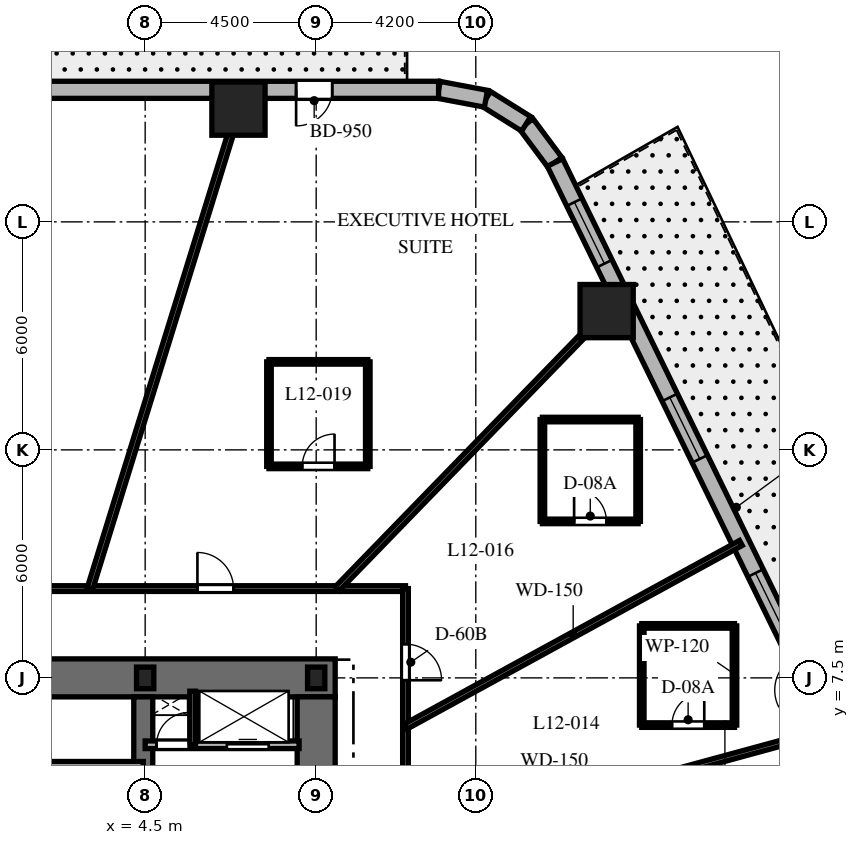
"""IFC4 building model, lengths in metres.
Left out: names, types, materials, properties, quantities, classifications, styles, units other than length and angle.
Written with IfcOpenShell. Run it as: python <this file> out.ifc"""

import sys

from ifc_helpers import new_model, si_unit, direction, frame, frame_2d, origin, origin_2d, place, context, subcontext, project, spatial, rectangle, i_section, extrude, element, fill, save


model = new_model("IFC4")
c1 = context("Model", 3, precision=1e-05, world=origin(), true_north=direction((0.0, 1.0)))
c2 = subcontext(c1, "Body", "Model", "MODEL_VIEW")
j1 = project(units=[si_unit("LENGTHUNIT", "METRE"), si_unit("PLANEANGLEUNIT", "RADIAN")], contexts=[c1])
p1 = place(None, origin())
s1 = spatial("IfcSite", under=j1, at=p1, CompositionType="ELEMENT")
p2 = place(p1, origin())
s2 = spatial("IfcBuilding", under=s1, at=p2, CompositionType="ELEMENT")
p3 = place(p2, frame((0.0, 0.0, 56.4)))
s3 = spatial("IfcBuildingStorey", under=s2, at=p3, CompositionType="ELEMENT", Elevation=56.4)
p4 = place(p3, frame((1.85, 7.5, 0.0), z_axis=(0.0, 0.0, 1.0), x_axis=(1.0, 0.0, 0.0)))
e1 = element("IfcWall", 1, at=p4, inside=s3, PredefinedType="SHEAR", context=c2, shape_type="SweptSolid", body=[
    extrude(rectangle(XDim=7.65, YDim=1.0, at=frame_2d((3.825, 0.0))), origin(), (0.0, 0.0, 1.0), 3.7),
])
p5 = place(p3, frame((9.0, -7.0, 0.0), z_axis=(0.0, 0.0, 1.0), x_axis=(0.0, 1.0, 0.0)))
e2 = element("IfcWall", 2, at=p5, inside=s3, PredefinedType="SHEAR", context=c2, shape_type="SweptSolid", body=[
    extrude(rectangle(XDim=14.0, YDim=1.0, at=frame_2d((7.0, 0.0))), origin(), (0.0, 0.0, 1.0), 3.7),
])
p6 = place(p5, frame((10.125, 0.0, 0.0)))
e3 = element("IfcOpeningElement", 3, at=p6, cuts=e2, PredefinedType="OPENING", context=c2, shape_type="SweptSolid", body=[
    extrude(rectangle(XDim=1.05, YDim=2.15, at=frame_2d((0.525, 1.075))), frame((0.0, 0.51, 0.0), z_axis=(0.0, -1.0, 0.0), x_axis=(1.0, 0.0, 0.0)), (0.0, 0.0, 1.0), 1.02),
])
p7 = place(p3, frame((4.45, 2.25, 0.0), z_axis=(0.0, 0.0, 1.0), x_axis=(0.0, 1.0, 0.0)))
e4 = element("IfcWall", 4, at=p7, inside=s3, PredefinedType="SHEAR", context=c2, shape_type="SweptSolid", body=[
    extrude(rectangle(XDim=4.75, YDim=0.5, at=frame_2d((2.375, 0.0))), origin(), (0.0, 0.0, 1.0), 3.7),
])
for number, where, z_axis, x_axis in (
    (5, (9.0, 7.5, 0.0), (0.0, 0.0, 1.0), (1.0, 0.0, 0.0)),
    (6, (4.5, 7.5, 0.0), (0.0, 0.0, 1.0), (1.0, 0.0, 0.0)),
):
    element("IfcColumn", number, at=place(p3, frame(where, z_axis=z_axis, x_axis=x_axis)), inside=s3, PredefinedType="COLUMN", context=c2, shape_type="SweptSolid", body=[
        extrude(i_section(OverallWidth=0.454, OverallDepth=0.569, WebThickness=0.078, FlangeThickness=0.125, at=origin_2d()), origin(), (0.0, 0.0, 1.0), 3.7),
    ])
for number, where, z_axis, x_axis in (
    (7, (16.643, 17.152, 0.0), (0.0, 0.0, 1.0), (1.0, 0.0, 0.0)),
    (8, (6.955, 22.48, 0.0), (0.0, 0.0, 1.0), (1.0, 0.0, 0.0)),
):
    element("IfcColumn", number, at=place(p3, frame(where, z_axis=z_axis, x_axis=x_axis)), inside=s3, PredefinedType="COLUMN", context=c2, shape_type="SweptSolid", body=[
        extrude(rectangle(XDim=1.4, YDim=1.4, at=origin_2d()), origin(), (0.0, 0.0, 1.0), 3.7),
    ])
p8 = place(p3, frame((15.284, 21.062, 0.0), z_axis=(0.0, 0.0, 1.0), x_axis=(-0.597595366449, 0.801797841104, 0.0)))
e9 = element("IfcWall", 9, at=p8, inside=s3, PredefinedType="SOLIDWALL", context=c2, shape_type="SweptSolid", body=[
    extrude(rectangle(XDim=1.269, YDim=0.45, at=frame_2d((0.634, 0.0))), origin(), (0.0, 0.0, 1.0), 3.4),
])
p9 = place(p3, frame((14.526, 22.08, 0.0), z_axis=(0.0, 0.0, 1.0), x_axis=(-0.848185203596, 0.529699783275, 0.0)))
e10 = element("IfcWall", 10, at=p9, inside=s3, PredefinedType="SOLIDWALL", context=c2, shape_type="SweptSolid", body=[
    extrude(rectangle(XDim=1.247, YDim=0.45, at=frame_2d((0.624, 0.0))), origin(), (0.0, 0.0, 1.0), 3.4),
])
p10 = place(p3, frame((13.468, 22.74, 0.0), z_axis=(0.0, 0.0, 1.0), x_axis=(-0.982717174228, 0.185113358451, 0.0)))
e11 = element("IfcWall", 11, at=p10, inside=s3, PredefinedType="SOLIDWALL", context=c2, shape_type="SweptSolid", body=[
    extrude(rectangle(XDim=1.269, YDim=0.45, at=frame_2d((0.634, 0.0))), origin(), (0.0, 0.0, 1.0), 3.4),
])
p11 = place(p3, frame((24.336, 2.532, 0.0), z_axis=(0.0, 0.0, 1.0), x_axis=(-0.438931326393, 0.898520612291, 0.0)))
e12 = element("IfcWall", 12, at=p11, inside=s3, PredefinedType="SOLIDWALL", context=c2, shape_type="SweptSolid", body=[
    extrude(rectangle(XDim=20.623, YDim=0.45, at=frame_2d((10.312, 0.0))), origin(), (0.0, 0.0, 1.0), 3.4),
])
p12 = place(p11, frame((5.171, 0.0, 0.0)))
e13 = element("IfcOpeningElement", 13, at=p12, cuts=e12, PredefinedType="OPENING", context=c2, shape_type="SweptSolid", body=[
    extrude(rectangle(XDim=1.0, YDim=2.15, at=frame_2d((0.5, 1.075))), frame((0.0, 0.235, 0.0), z_axis=(0.0, -1.0, 0.0), x_axis=(1.0, 0.0, 0.0)), (0.0, 0.0, 1.0), 0.47),
])
p13 = place(p11, frame((6.8, 0.0, 0.8)))
e14 = element("IfcOpeningElement", 14, at=p13, cuts=e12, PredefinedType="OPENING", context=c2, shape_type="SweptSolid", body=[
    extrude(rectangle(XDim=1.8, YDim=1.8, at=frame_2d((0.9, 0.9))), frame((0.0, 0.235, 0.0), z_axis=(0.0, -1.0, 0.0), x_axis=(1.0, 0.0, 0.0)), (0.0, 0.0, 1.0), 0.47),
])
p14 = place(p11, frame((11.942, 0.0, 0.8)))
e15 = element("IfcOpeningElement", 15, at=p14, cuts=e12, PredefinedType="OPENING", context=c2, shape_type="SweptSolid", body=[
    extrude(rectangle(XDim=1.8, YDim=1.8, at=frame_2d((0.9, 0.9))), frame((0.0, 0.235, 0.0), z_axis=(0.0, -1.0, 0.0), x_axis=(1.0, 0.0, 0.0)), (0.0, 0.0, 1.0), 0.47),
])
p15 = place(p11, frame((17.66, 0.0, 0.8)))
e16 = element("IfcOpeningElement", 16, at=p15, cuts=e12, PredefinedType="OPENING", context=c2, shape_type="SweptSolid", body=[
    extrude(rectangle(XDim=1.8, YDim=1.8, at=frame_2d((0.9, 0.9))), frame((0.0, 0.235, 0.0), z_axis=(0.0, -1.0, 0.0), x_axis=(1.0, 0.0, 0.0)), (0.0, 0.0, 1.0), 0.47),
])
p16 = place(p11, frame((1.214, 0.0, 0.8)))
e17 = element("IfcOpeningElement", 17, at=p16, cuts=e12, PredefinedType="OPENING", context=c2, shape_type="SweptSolid", body=[
    extrude(rectangle(XDim=1.8, YDim=1.8, at=frame_2d((0.9, 0.9))), frame((0.0, 0.235, 0.0), z_axis=(0.0, -1.0, 0.0), x_axis=(1.0, 0.0, 0.0)), (0.0, 0.0, 1.0), 0.47),
])
p17 = place(p3, frame((12.221, 22.975, 0.0), z_axis=(0.0, 0.0, 1.0), x_axis=(-1.0, 0.0, 0.0)))
e18 = element("IfcWall", 18, at=p17, inside=s3, PredefinedType="SOLIDWALL", context=c2, shape_type="SweptSolid", body=[
    extrude(rectangle(XDim=26.389, YDim=0.45, at=frame_2d((13.195, 0.0))), origin(), (0.0, 0.0, 1.0), 3.4),
])
p18 = place(p17, frame((2.799, 0.0, 0.0)))
e19 = element("IfcOpeningElement", 19, at=p18, cuts=e18, PredefinedType="OPENING", context=c2, shape_type="SweptSolid", body=[
    extrude(rectangle(XDim=0.95, YDim=2.15, at=frame_2d((0.475, 1.075))), frame((0.0, 0.235, 0.0), z_axis=(0.0, -1.0, 0.0), x_axis=(1.0, 0.0, 0.0)), (0.0, 0.0, 1.0), 0.47),
])
p19 = place(p17, frame((12.296, 0.0, 0.8)))
e20 = element("IfcOpeningElement", 20, at=p19, cuts=e18, PredefinedType="OPENING", context=c2, shape_type="SweptSolid", body=[
    extrude(rectangle(XDim=1.8, YDim=1.8, at=frame_2d((0.9, 0.9))), frame((0.0, 0.235, 0.0), z_axis=(0.0, -1.0, 0.0), x_axis=(1.0, 0.0, 0.0)), (0.0, 0.0, 1.0), 0.47),
])
p20 = place(p17, frame((22.938, 0.0, 0.8)))
e21 = element("IfcOpeningElement", 21, at=p20, cuts=e18, PredefinedType="OPENING", context=c2, shape_type="SweptSolid", body=[
    extrude(rectangle(XDim=1.8, YDim=1.8, at=frame_2d((0.9, 0.9))), frame((0.0, 0.235, 0.0), z_axis=(0.0, -1.0, 0.0), x_axis=(1.0, 0.0, 0.0)), (0.0, 0.0, 1.0), 0.47),
])
p21 = place(p3, frame((4.5, 5.74, 0.0), z_axis=(0.0, 0.0, 1.0), x_axis=(1.0, 0.0, 0.0)))
e22 = element("IfcWall", 22, at=p21, inside=s3, PredefinedType="PARTITIONING", context=c2, shape_type="SweptSolid", body=[
    extrude(rectangle(XDim=4.05, YDim=0.2, at=frame_2d((2.025, 0.0))), origin(), (0.0, 0.0, 1.0), 3.4),
])
p22 = place(p21, frame((0.3, 0.0, 0.0)))
e23 = element("IfcOpeningElement", 23, at=p22, cuts=e22, PredefinedType="OPENING", context=c2, shape_type="SweptSolid", body=[
    extrude(rectangle(XDim=0.85, YDim=2.03, at=frame_2d((0.425, 1.015))), frame((0.0, 0.11, 0.0), z_axis=(0.0, -1.0, 0.0), x_axis=(1.0, 0.0, 0.0)), (0.0, 0.0, 1.0), 0.22),
])
p23 = place(p21, frame((2.15, 0.0, 0.0)))
e24 = element("IfcOpeningElement", 24, at=p23, cuts=e22, PredefinedType="OPENING", context=c2, shape_type="SweptSolid", body=[
    extrude(rectangle(XDim=1.1, YDim=2.2, at=frame_2d((0.55, 1.1))), frame((0.0, 0.11, 0.0), z_axis=(0.0, -1.0, 0.0), x_axis=(1.0, 0.0, 0.0)), (0.0, 0.0, 1.0), 0.22),
])
p24 = place(p3, frame((5.75, 5.74, 0.0), z_axis=(0.0, 0.0, 1.0), x_axis=(0.0, 1.0, 0.0)))
e25 = element("IfcWall", 25, at=p24, inside=s3, PredefinedType="PARTITIONING", context=c2, shape_type="SweptSolid", body=[
    extrude(rectangle(XDim=1.41, YDim=0.15, at=frame_2d((0.705, 0.0))), origin(), (0.0, 0.0, 1.0), 3.4),
])
p25 = place(p3, frame((1.85, 5.2, 0.0), z_axis=(0.0, 0.0, 1.0), x_axis=(1.0, 0.0, 0.0)))
e26 = element("IfcWall", 26, at=p25, inside=s3, PredefinedType="PARTITIONING", context=c2, shape_type="SweptSolid", body=[
    extrude(rectangle(XDim=2.6, YDim=0.2, at=frame_2d((1.3, 0.0))), origin(), (0.0, 0.0, 1.0), 3.4),
])
p26 = place(p3, frame((-11.35, 9.85, 0.0), z_axis=(0.0, 0.0, 1.0), x_axis=(1.0, 0.0, 0.0)))
e27 = element("IfcWall", 27, at=p26, inside=s3, PredefinedType="PARTITIONING", context=c2, shape_type="SweptSolid", body=[
    extrude(rectangle(XDim=22.7, YDim=0.15, at=frame_2d((11.35, 0.0))), origin(), (0.0, 0.0, 1.0), 2.84),
])
p27 = place(p26, frame((17.225, 0.0, 0.0)))
e28 = element("IfcOpeningElement", 28, at=p27, cuts=e27, PredefinedType="OPENING", context=c2, shape_type="SweptSolid", body=[
    extrude(rectangle(XDim=0.95, YDim=2.03, at=frame_2d((0.475, 1.015))), frame((0.0, 0.085, 0.0), z_axis=(0.0, -1.0, 0.0), x_axis=(1.0, 0.0, 0.0)), (0.0, 0.0, 1.0), 0.17),
])
p28 = place(p26, frame((10.444, 0.0, 0.0)))
e29 = element("IfcOpeningElement", 29, at=p28, cuts=e27, PredefinedType="OPENING", context=c2, shape_type="SweptSolid", body=[
    extrude(rectangle(XDim=0.95, YDim=2.03, at=frame_2d((0.475, 1.015))), frame((0.0, 0.085, 0.0), z_axis=(0.0, -1.0, 0.0), x_axis=(1.0, 0.0, 0.0)), (0.0, 0.0, 1.0), 0.17),
])
p29 = place(p26, frame((3.369, 0.0, 0.0)))
e30 = element("IfcOpeningElement", 30, at=p29, cuts=e27, PredefinedType="OPENING", context=c2, shape_type="SweptSolid", body=[
    extrude(rectangle(XDim=0.95, YDim=2.03, at=frame_2d((0.475, 1.015))), frame((0.0, 0.085, 0.0), z_axis=(0.0, -1.0, 0.0), x_axis=(1.0, 0.0, 0.0)), (0.0, 0.0, 1.0), 0.17),
])
p30 = place(p3, frame((11.35, 9.85, 0.0), z_axis=(0.0, 0.0, 1.0), x_axis=(0.0, -1.0, 0.0)))
e31 = element("IfcWall", 31, at=p30, inside=s3, PredefinedType="PARTITIONING", context=c2, shape_type="SweptSolid", body=[
    extrude(rectangle(XDim=19.7, YDim=0.15, at=frame_2d((9.85, 0.0))), origin(), (0.0, 0.0, 1.0), 2.84),
])
p31 = place(p30, frame((4.704, 0.0, 0.0)))
e32 = element("IfcOpeningElement", 32, at=p31, cuts=e31, PredefinedType="OPENING", context=c2, shape_type="SweptSolid", body=[
    extrude(rectangle(XDim=0.95, YDim=2.03, at=frame_2d((0.475, 1.015))), frame((0.0, 0.085, 0.0), z_axis=(0.0, -1.0, 0.0), x_axis=(1.0, 0.0, 0.0)), (0.0, 0.0, 1.0), 0.17),
])
p32 = place(p30, frame((1.462, 0.0, 0.0)))
e33 = element("IfcOpeningElement", 33, at=p32, cuts=e31, PredefinedType="OPENING", context=c2, shape_type="SweptSolid", body=[
    extrude(rectangle(XDim=0.95, YDim=2.03, at=frame_2d((0.475, 1.015))), frame((0.0, 0.085, 0.0), z_axis=(0.0, -1.0, 0.0), x_axis=(1.0, 0.0, 0.0)), (0.0, 0.0, 1.0), 0.17),
])
p33 = place(p30, frame((15.191, 0.0, 0.0)))
e34 = element("IfcOpeningElement", 34, at=p33, cuts=e31, PredefinedType="OPENING", context=c2, shape_type="SweptSolid", body=[
    extrude(rectangle(XDim=0.95, YDim=2.03, at=frame_2d((0.475, 1.015))), frame((0.0, 0.085, 0.0), z_axis=(0.0, -1.0, 0.0), x_axis=(1.0, 0.0, 0.0)), (0.0, 0.0, 1.0), 0.17),
])
p34 = place(p30, frame((8.838, 0.0, 0.0)))
e35 = element("IfcOpeningElement", 35, at=p34, cuts=e31, PredefinedType="OPENING", context=c2, shape_type="SweptSolid", body=[
    extrude(rectangle(XDim=0.95, YDim=2.03, at=frame_2d((0.475, 1.015))), frame((0.0, 0.085, 0.0), z_axis=(0.0, -1.0, 0.0), x_axis=(1.0, 0.0, 0.0)), (0.0, 0.0, 1.0), 0.17),
])
p35 = place(p3, frame((11.35, 3.091, 0.0), z_axis=(0.0, 0.0, 1.0), x_axis=(0.964859685283, 0.262765651704, 0.0)))
e36 = element("IfcWall", 36, at=p35, inside=s3, PredefinedType="PARTITIONING", context=c2, shape_type="SweptSolid", body=[
    extrude(rectangle(XDim=11.629, YDim=0.15, at=frame_2d((5.814, 0.0))), origin(), (0.0, 0.0, 1.0), 2.54),
])
p36 = place(p3, frame((11.35, 6.217, 0.0), z_axis=(0.0, 0.0, 1.0), x_axis=(0.877047587135, 0.480403507378, 0.0)))
e37 = element("IfcWall", 37, at=p36, inside=s3, PredefinedType="PARTITIONING", context=c2, shape_type="SweptSolid", body=[
    extrude(rectangle(XDim=10.062, YDim=0.15, at=frame_2d((5.031, 0.0))), origin(), (0.0, 0.0, 1.0), 2.54),
])
p37 = place(p3, frame((9.558, 9.85, 0.0), z_axis=(0.0, 0.0, 1.0), x_axis=(0.69638346089, 0.717669893056, 0.0)))
e38 = element("IfcWall", 38, at=p37, inside=s3, PredefinedType="PARTITIONING", context=c2, shape_type="SweptSolid", body=[
    extrude(rectangle(XDim=10.701, YDim=0.15, at=frame_2d((5.351, 0.0))), origin(), (0.0, 0.0, 1.0), 2.54),
])
p38 = place(p3, frame((3.048, 9.85, 0.0), z_axis=(0.0, 0.0, 1.0), x_axis=(0.295553992761, 0.955326037206, 0.0)))
e39 = element("IfcWall", 39, at=p38, inside=s3, PredefinedType="PARTITIONING", context=c2, shape_type="SweptSolid", body=[
    extrude(rectangle(XDim=13.739, YDim=0.15, at=frame_2d((6.869, 0.0))), origin(), (0.0, 0.0, 1.0), 2.54),
])
p39 = place(p3, frame((17.567, 6.258, 0.0), z_axis=(0.0, 0.0, 1.0), x_axis=(1.0, 0.0, 0.0)))
e40 = element("IfcWall", 40, at=p39, inside=s3, PredefinedType="PARTITIONING", context=c2, shape_type="SweptSolid", body=[
    extrude(rectangle(XDim=2.44, YDim=0.12, at=frame_2d((1.22, 0.0))), origin(), (0.0, 0.0, 1.0), 2.84),
])
p40 = place(p39, frame((0.795, 0.0, 0.0)))
e41 = element("IfcOpeningElement", 41, at=p40, cuts=e40, PredefinedType="OPENING", context=c2, shape_type="SweptSolid", body=[
    extrude(rectangle(XDim=0.85, YDim=2.03, at=frame_2d((0.425, 1.015))), frame((0.0, 0.07, 0.0), z_axis=(0.0, -1.0, 0.0), x_axis=(1.0, 0.0, 0.0)), (0.0, 0.0, 1.0), 0.14),
])
p41 = place(p3, frame((20.007, 6.258, 0.0), z_axis=(0.0, 0.0, 1.0), x_axis=(0.0, 1.0, 0.0)))
e42 = element("IfcWall", 42, at=p41, inside=s3, PredefinedType="PARTITIONING", context=c2, shape_type="SweptSolid", body=[
    extrude(rectangle(XDim=2.61, YDim=0.12, at=frame_2d((1.305, 0.0))), origin(), (0.0, 0.0, 1.0), 2.84),
])
p42 = place(p3, frame((20.007, 8.868, 0.0), z_axis=(0.0, 0.0, 1.0), x_axis=(-1.0, 0.0, 0.0)))
e43 = element("IfcWall", 43, at=p42, inside=s3, PredefinedType="PARTITIONING", context=c2, shape_type="SweptSolid", body=[
    extrude(rectangle(XDim=2.44, YDim=0.12, at=frame_2d((1.22, 0.0))), origin(), (0.0, 0.0, 1.0), 3.4),
])
p43 = place(p3, frame((17.567, 8.868, 0.0), z_axis=(0.0, 0.0, 1.0), x_axis=(0.0, -1.0, 0.0)))
e44 = element("IfcWall", 44, at=p43, inside=s3, PredefinedType="PARTITIONING", context=c2, shape_type="SweptSolid", body=[
    extrude(rectangle(XDim=2.61, YDim=0.12, at=frame_2d((1.305, 0.0))), origin(), (0.0, 0.0, 1.0), 2.84),
])
p44 = place(p3, frame((14.952, 11.618, 0.0), z_axis=(0.0, 0.0, 1.0), x_axis=(1.0, 0.0, 0.0)))
e45 = element("IfcWall", 45, at=p44, inside=s3, PredefinedType="PARTITIONING", context=c2, shape_type="SweptSolid", body=[
    extrude(rectangle(XDim=2.52, YDim=0.12, at=frame_2d((1.26, 0.0))), origin(), (0.0, 0.0, 1.0), 2.927),
])
p45 = place(p44, frame((0.835, 0.0, 0.0)))
e46 = element("IfcOpeningElement", 46, at=p45, cuts=e45, PredefinedType="OPENING", context=c2, shape_type="SweptSolid", body=[
    extrude(rectangle(XDim=0.85, YDim=2.03, at=frame_2d((0.425, 1.015))), frame((0.0, 0.07, 0.0), z_axis=(0.0, -1.0, 0.0), x_axis=(1.0, 0.0, 0.0)), (0.0, 0.0, 1.0), 0.14),
])
p46 = place(p3, frame((17.472, 11.618, 0.0), z_axis=(0.0, 0.0, 1.0), x_axis=(0.0, 1.0, 0.0)))
e47 = element("IfcWall", 47, at=p46, inside=s3, PredefinedType="PARTITIONING", context=c2, shape_type="SweptSolid", body=[
    extrude(rectangle(XDim=2.68, YDim=0.12, at=frame_2d((1.34, 0.0))), origin(), (0.0, 0.0, 1.0), 3.4),
])
p47 = place(p3, frame((17.472, 14.298, 0.0), z_axis=(0.0, 0.0, 1.0), x_axis=(-1.0, 0.0, 0.0)))
e48 = element("IfcWall", 48, at=p47, inside=s3, PredefinedType="PARTITIONING", context=c2, shape_type="SweptSolid", body=[
    extrude(rectangle(XDim=2.52, YDim=0.12, at=frame_2d((1.26, 0.0))), origin(), (0.0, 0.0, 1.0), 3.4),
])
p48 = place(p3, frame((14.952, 14.298, 0.0), z_axis=(0.0, 0.0, 1.0), x_axis=(0.0, -1.0, 0.0)))
e49 = element("IfcWall", 49, at=p48, inside=s3, PredefinedType="PARTITIONING", context=c2, shape_type="SweptSolid", body=[
    extrude(rectangle(XDim=2.68, YDim=0.12, at=frame_2d((1.34, 0.0))), origin(), (0.0, 0.0, 1.0), 2.927),
])
p49 = place(p3, frame((7.758, 13.066, 0.0), z_axis=(0.0, 0.0, 1.0), x_axis=(1.0, 0.0, 0.0)))
e50 = element("IfcWall", 50, at=p49, inside=s3, PredefinedType="PARTITIONING", context=c2, shape_type="SweptSolid", body=[
    extrude(rectangle(XDim=2.6, YDim=0.12, at=frame_2d((1.3, 0.0))), origin(), (0.0, 0.0, 1.0), 2.84),
])
p50 = place(p49, frame((0.875, 0.0, 0.0)))
e51 = element("IfcOpeningElement", 51, at=p50, cuts=e50, PredefinedType="OPENING", context=c2, shape_type="SweptSolid", body=[
    extrude(rectangle(XDim=0.85, YDim=2.03, at=frame_2d((0.425, 1.015))), frame((0.0, 0.07, 0.0), z_axis=(0.0, -1.0, 0.0), x_axis=(1.0, 0.0, 0.0)), (0.0, 0.0, 1.0), 0.14),
])
p51 = place(p3, frame((10.358, 13.066, 0.0), z_axis=(0.0, 0.0, 1.0), x_axis=(0.0, 1.0, 0.0)))
e52 = element("IfcWall", 52, at=p51, inside=s3, PredefinedType="PARTITIONING", context=c2, shape_type="SweptSolid", body=[
    extrude(rectangle(XDim=2.75, YDim=0.12, at=frame_2d((1.375, 0.0))), origin(), (0.0, 0.0, 1.0), 3.4),
])
p52 = place(p3, frame((10.358, 15.816, 0.0), z_axis=(0.0, 0.0, 1.0), x_axis=(-1.0, 0.0, 0.0)))
e53 = element("IfcWall", 53, at=p52, inside=s3, PredefinedType="PARTITIONING", context=c2, shape_type="SweptSolid", body=[
    extrude(rectangle(XDim=2.6, YDim=0.12, at=frame_2d((1.3, 0.0))), origin(), (0.0, 0.0, 1.0), 2.84),
])
p53 = place(p3, frame((7.758, 15.816, 0.0), z_axis=(0.0, 0.0, 1.0), x_axis=(0.0, -1.0, 0.0)))
e54 = element("IfcWall", 54, at=p53, inside=s3, PredefinedType="PARTITIONING", context=c2, shape_type="SweptSolid", body=[
    extrude(rectangle(XDim=2.75, YDim=0.12, at=frame_2d((1.375, 0.0))), origin(), (0.0, 0.0, 1.0), 2.84),
])
p54 = place(p13, origin())
e55 = element("IfcWindow", 55, at=p54, inside=s3, PartitioningType="SINGLE_PANEL", PredefinedType="WINDOW", context=c2, shape_type="SweptSolid", body=[
    extrude(rectangle(XDim=1.8, YDim=1.8, at=frame_2d((0.9, 0.9))), frame((0.0, 0.03, 0.0), z_axis=(0.0, -1.0, 0.0), x_axis=(1.0, 0.0, 0.0)), (0.0, 0.0, 1.0), 0.06),
])
fill(e14, e55)
p55 = place(p14, origin())
e56 = element("IfcWindow", 56, at=p55, inside=s3, PartitioningType="SINGLE_PANEL", PredefinedType="WINDOW", context=c2, shape_type="SweptSolid", body=[
    extrude(rectangle(XDim=1.8, YDim=1.8, at=frame_2d((0.9, 0.9))), frame((0.0, 0.03, 0.0), z_axis=(0.0, -1.0, 0.0), x_axis=(1.0, 0.0, 0.0)), (0.0, 0.0, 1.0), 0.06),
])
fill(e15, e56)
p56 = place(p15, origin())
e57 = element("IfcWindow", 57, at=p56, inside=s3, PartitioningType="SINGLE_PANEL", PredefinedType="WINDOW", context=c2, shape_type="SweptSolid", body=[
    extrude(rectangle(XDim=1.8, YDim=1.8, at=frame_2d((0.9, 0.9))), frame((0.0, 0.03, 0.0), z_axis=(0.0, -1.0, 0.0), x_axis=(1.0, 0.0, 0.0)), (0.0, 0.0, 1.0), 0.06),
])
fill(e16, e57)
p57 = place(p18, origin())
e58 = element("IfcDoor", 58, at=p57, inside=s3, OperationType="SINGLE_SWING_RIGHT", PredefinedType="DOOR", context=c2, shape_type="SweptSolid", body=[
    extrude(rectangle(XDim=0.95, YDim=2.15, at=frame_2d((0.475, 1.075))), frame((0.0, 0.025, 0.0), z_axis=(0.0, -1.0, 0.0), x_axis=(1.0, 0.0, 0.0)), (0.0, 0.0, 1.0), 0.05),
])
fill(e19, e58)
p58 = place(p22, origin())
e59 = element("IfcDoor", 59, at=p58, inside=s3, OperationType="SINGLE_SWING_RIGHT", PredefinedType="DOOR", context=c2, shape_type="SweptSolid", body=[
    extrude(rectangle(XDim=0.85, YDim=2.03, at=frame_2d((0.425, 1.015))), frame((0.0, 0.025, 0.0), z_axis=(0.0, -1.0, 0.0), x_axis=(1.0, 0.0, 0.0)), (0.0, 0.0, 1.0), 0.05),
])
fill(e23, e59)
p59 = place(p23, origin())
e60 = element("IfcDoor", 60, at=p59, inside=s3, OperationType="SLIDING_TO_RIGHT", PredefinedType="DOOR", context=c2, shape_type="SweptSolid", body=[
    extrude(rectangle(XDim=1.1, YDim=2.2, at=frame_2d((0.55, 1.1))), frame((0.0, 0.025, 0.0), z_axis=(0.0, -1.0, 0.0), x_axis=(1.0, 0.0, 0.0)), (0.0, 0.0, 1.0), 0.05),
])
fill(e24, e60)
p60 = place(p40, origin())
e61 = element("IfcDoor", 61, at=p60, inside=s3, OperationType="SINGLE_SWING_RIGHT", PredefinedType="DOOR", context=c2, shape_type="SweptSolid", body=[
    extrude(rectangle(XDim=0.85, YDim=2.03, at=frame_2d((0.425, 1.015))), frame((0.0, 0.025, 0.0), z_axis=(0.0, -1.0, 0.0), x_axis=(1.0, 0.0, 0.0)), (0.0, 0.0, 1.0), 0.05),
])
fill(e41, e61)
p61 = place(p32, origin())
e62 = element("IfcDoor", 62, at=p61, inside=s3, OperationType="SINGLE_SWING_RIGHT", PredefinedType="DOOR", context=c2, shape_type="SweptSolid", body=[
    extrude(rectangle(XDim=0.95, YDim=2.03, at=frame_2d((0.475, 1.015))), frame((0.0, 0.025, 0.0), z_axis=(0.0, -1.0, 0.0), x_axis=(1.0, 0.0, 0.0)), (0.0, 0.0, 1.0), 0.05),
])
fill(e33, e62)
p62 = place(p45, origin())
e63 = element("IfcDoor", 63, at=p62, inside=s3, OperationType="SINGLE_SWING_LEFT", PredefinedType="DOOR", context=c2, shape_type="SweptSolid", body=[
    extrude(rectangle(XDim=0.85, YDim=2.03, at=frame_2d((0.425, 1.015))), frame((0.0, 0.025, 0.0), z_axis=(0.0, -1.0, 0.0), x_axis=(1.0, 0.0, 0.0)), (0.0, 0.0, 1.0), 0.05),
])
fill(e46, e63)
p63 = place(p27, origin())
e64 = element("IfcDoor", 64, at=p63, inside=s3, OperationType="SINGLE_SWING_LEFT", PredefinedType="DOOR", context=c2, shape_type="SweptSolid", body=[
    extrude(rectangle(XDim=0.95, YDim=2.03, at=frame_2d((0.475, 1.015))), frame((0.0, 0.025, 0.0), z_axis=(0.0, -1.0, 0.0), x_axis=(1.0, 0.0, 0.0)), (0.0, 0.0, 1.0), 0.05),
])
fill(e28, e64)
p64 = place(p50, origin())
e65 = element("IfcDoor", 65, at=p64, inside=s3, OperationType="SINGLE_SWING_RIGHT", PredefinedType="DOOR", context=c2, shape_type="SweptSolid", body=[
    extrude(rectangle(XDim=0.85, YDim=2.03, at=frame_2d((0.425, 1.015))), frame((0.0, 0.025, 0.0), z_axis=(0.0, -1.0, 0.0), x_axis=(1.0, 0.0, 0.0)), (0.0, 0.0, 1.0), 0.05),
])
fill(e51, e65)
save(model, sys.argv[1])
